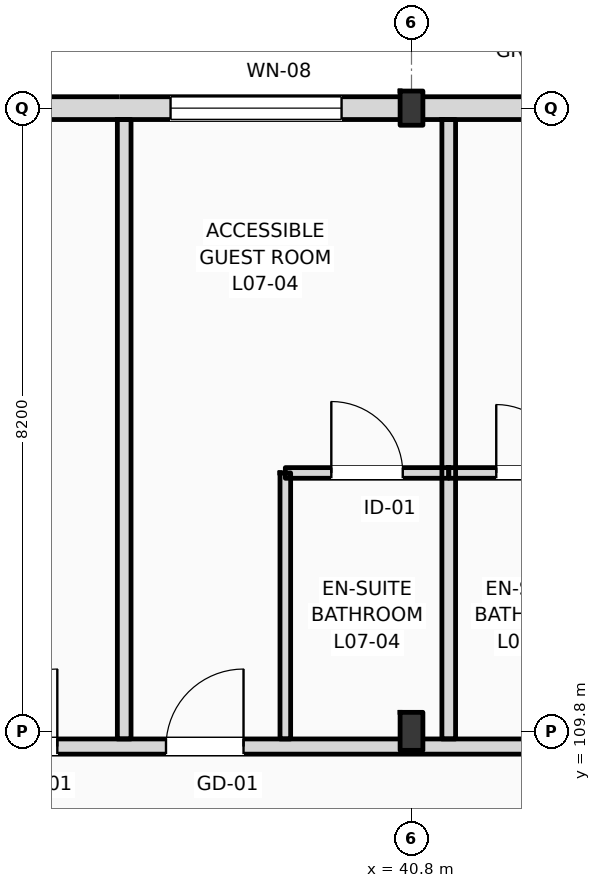
"""IFC4 building model, lengths in metres.
Left out: names, types, materials, properties, quantities, classifications, styles, units other than length and angle.
Written with IfcOpenShell. Run it as: python <this file> out.ifc"""

import sys

from ifc_helpers import new_model, si_unit, direction, frame, frame_2d, origin, origin_2d, place, context, subcontext, project, spatial, rectangle, i_section, extrude, element, fill, save


model = new_model("IFC4")
c1 = context("Model", 3, precision=1e-05, world=origin(), true_north=direction((0.0, 1.0)))
c2 = subcontext(c1, "Body", "Model", "MODEL_VIEW")
j1 = project(units=[si_unit("LENGTHUNIT", "METRE"), si_unit("PLANEANGLEUNIT", "RADIAN")], contexts=[c1])
p1 = place(None, origin())
s1 = spatial("IfcSite", under=j1, at=p1, CompositionType="ELEMENT")
p2 = place(p1, origin())
s2 = spatial("IfcBuilding", under=s1, at=p2, CompositionType="ELEMENT")
p3 = place(p2, frame((0.0, 0.0, 31.8)))
s3 = spatial("IfcBuildingStorey", under=s2, at=p3, CompositionType="ELEMENT", Elevation=31.8)
p4 = place(p3, frame((40.8, 109.8, 0.0), z_axis=(0.0, 0.0, 1.0), x_axis=(1.0, 0.0, 0.0)))
e1 = element("IfcColumn", 1, at=p4, inside=s3, PredefinedType="COLUMN", context=c2, shape_type="SweptSolid", body=[
    extrude(i_section(OverallWidth=0.3, OverallDepth=0.5, WebThickness=0.014, FlangeThickness=0.028, FilletRadius=0.027, at=origin_2d()), origin(), (0.0, 0.0, 1.0), 3.6),
])
p5 = place(p3, frame((40.8, 118.0, 0.0), z_axis=(0.0, 0.0, 1.0), x_axis=(1.0, 0.0, 0.0)))
e2 = element("IfcColumn", 2, at=p5, inside=s3, PredefinedType="COLUMN", context=c2, shape_type="SweptSolid", body=[
    extrude(i_section(OverallWidth=0.3, OverallDepth=0.45, WebThickness=0.014, FlangeThickness=0.026, FilletRadius=0.027, at=origin_2d()), origin(), (0.0, 0.0, 1.0), 3.6),
])
p6 = place(p3, frame((22.5, 118.0, 0.0), z_axis=(0.0, 0.0, 1.0), x_axis=(1.0, 0.0, 0.0)))
e3 = element("IfcWall", 3, at=p6, inside=s3, PredefinedType="STANDARD", context=c2, shape_type="SweptSolid", body=[
    extrude(rectangle(XDim=97.5, YDim=0.3, at=frame_2d((48.75, 0.0))), origin(), (0.0, 0.0, 1.0), 2.72),
])
p7 = place(p6, frame((3.61, 0.0, 0.9)))
e4 = element("IfcOpeningElement", 4, at=p7, cuts=e3, PredefinedType="OPENING", context=c2, shape_type="SweptSolid", body=[
    extrude(rectangle(XDim=1.1, YDim=1.64, at=frame_2d((0.55, 0.82))), frame((0.0, 0.16, 0.0), z_axis=(0.0, -1.0, 0.0), x_axis=(1.0, 0.0, 0.0)), (0.0, 0.0, 1.0), 0.32),
])
p8 = place(p6, frame((6.855, 0.0, 0.0)))
e5 = element("IfcOpeningElement", 5, at=p8, cuts=e3, PredefinedType="OPENING", context=c2, shape_type="SweptSolid", body=[
    extrude(rectangle(XDim=1.2, YDim=2.25, at=frame_2d((0.6, 1.125))), frame((0.0, 0.16, 0.0), z_axis=(0.0, -1.0, 0.0), x_axis=(1.0, 0.0, 0.0)), (0.0, 0.0, 1.0), 0.32),
])
p9 = place(p6, frame((11.405, 0.0, 0.9)))
e6 = element("IfcOpeningElement", 6, at=p9, cuts=e3, PredefinedType="OPENING", context=c2, shape_type="SweptSolid", body=[
    extrude(rectangle(XDim=2.1, YDim=1.64, at=frame_2d((1.05, 0.82))), frame((0.0, 0.16, 0.0), z_axis=(0.0, -1.0, 0.0), x_axis=(1.0, 0.0, 0.0)), (0.0, 0.0, 1.0), 0.32),
])
p10 = place(p6, frame((15.13, 0.0, 0.9)))
e7 = element("IfcOpeningElement", 7, at=p10, cuts=e3, PredefinedType="OPENING", context=c2, shape_type="SweptSolid", body=[
    extrude(rectangle(XDim=2.25, YDim=1.64, at=frame_2d((1.125, 0.82))), frame((0.0, 0.16, 0.0), z_axis=(0.0, -1.0, 0.0), x_axis=(1.0, 0.0, 0.0)), (0.0, 0.0, 1.0), 0.32),
])
p11 = place(p6, frame((21.53, 0.0, 0.0)))
e8 = element("IfcOpeningElement", 8, at=p11, cuts=e3, PredefinedType="OPENING", context=c2, shape_type="SweptSolid", body=[
    extrude(rectangle(XDim=1.2, YDim=2.25, at=frame_2d((0.6, 1.125))), frame((0.0, 0.16, 0.0), z_axis=(0.0, -1.0, 0.0), x_axis=(1.0, 0.0, 0.0)), (0.0, 0.0, 1.0), 0.32),
])
p12 = place(p6, frame((24.18, 0.0, 0.9)))
e9 = element("IfcOpeningElement", 9, at=p12, cuts=e3, PredefinedType="OPENING", context=c2, shape_type="SweptSolid", body=[
    extrude(rectangle(XDim=1.1, YDim=1.64, at=frame_2d((0.55, 0.82))), frame((0.0, 0.16, 0.0), z_axis=(0.0, -1.0, 0.0), x_axis=(1.0, 0.0, 0.0)), (0.0, 0.0, 1.0), 0.32),
])
p13 = place(p6, frame((29.105, 0.0, 0.9)))
e10 = element("IfcOpeningElement", 10, at=p13, cuts=e3, PredefinedType="OPENING", context=c2, shape_type="SweptSolid", body=[
    extrude(rectangle(XDim=2.7, YDim=1.64, at=frame_2d((1.35, 0.82))), frame((0.0, 0.16, 0.0), z_axis=(0.0, -1.0, 0.0), x_axis=(1.0, 0.0, 0.0)), (0.0, 0.0, 1.0), 0.32),
])
p14 = place(p6, frame((34.83, 0.0, 0.9)))
e11 = element("IfcOpeningElement", 11, at=p14, cuts=e3, PredefinedType="OPENING", context=c2, shape_type="SweptSolid", body=[
    extrude(rectangle(XDim=1.8, YDim=1.64, at=frame_2d((0.9, 0.82))), frame((0.0, 0.16, 0.0), z_axis=(0.0, -1.0, 0.0), x_axis=(1.0, 0.0, 0.0)), (0.0, 0.0, 1.0), 0.32),
])
p15 = place(p6, frame((38.525, 0.0, 0.0)))
e12 = element("IfcOpeningElement", 12, at=p15, cuts=e3, PredefinedType="OPENING", context=c2, shape_type="SweptSolid", body=[
    extrude(rectangle(XDim=1.2, YDim=2.25, at=frame_2d((0.6, 1.125))), frame((0.0, 0.16, 0.0), z_axis=(0.0, -1.0, 0.0), x_axis=(1.0, 0.0, 0.0)), (0.0, 0.0, 1.0), 0.32),
])
p16 = place(p6, frame((42.73, 0.0, 0.9)))
e13 = element("IfcOpeningElement", 13, at=p16, cuts=e3, PredefinedType="OPENING", context=c2, shape_type="SweptSolid", body=[
    extrude(rectangle(XDim=3.05, YDim=1.64, at=frame_2d((1.525, 0.82))), frame((0.0, 0.16, 0.0), z_axis=(0.0, -1.0, 0.0), x_axis=(1.0, 0.0, 0.0)), (0.0, 0.0, 1.0), 0.32),
])
p17 = place(p6, frame((47.155, 0.0, 0.9)))
e14 = element("IfcOpeningElement", 14, at=p17, cuts=e3, PredefinedType="OPENING", context=c2, shape_type="SweptSolid", body=[
    extrude(rectangle(XDim=1.35, YDim=1.64, at=frame_2d((0.675, 0.82))), frame((0.0, 0.16, 0.0), z_axis=(0.0, -1.0, 0.0), x_axis=(1.0, 0.0, 0.0)), (0.0, 0.0, 1.0), 0.32),
])
p18 = place(p6, frame((53.065, 0.0, 0.0)))
e15 = element("IfcOpeningElement", 15, at=p18, cuts=e3, PredefinedType="OPENING", context=c2, shape_type="SweptSolid", body=[
    extrude(rectangle(XDim=1.2, YDim=2.25, at=frame_2d((0.6, 1.125))), frame((0.0, 0.16, 0.0), z_axis=(0.0, -1.0, 0.0), x_axis=(1.0, 0.0, 0.0)), (0.0, 0.0, 1.0), 0.32),
])
p19 = place(p6, frame((58.2, 0.0, 0.9)))
e16 = element("IfcOpeningElement", 16, at=p19, cuts=e3, PredefinedType="OPENING", context=c2, shape_type="SweptSolid", body=[
    extrude(rectangle(XDim=1.8, YDim=1.64, at=frame_2d((0.9, 0.82))), frame((0.0, 0.16, 0.0), z_axis=(0.0, -1.0, 0.0), x_axis=(1.0, 0.0, 0.0)), (0.0, 0.0, 1.0), 0.32),
])
p20 = place(p6, frame((61.13, 0.0, 0.9)))
e17 = element("IfcOpeningElement", 17, at=p20, cuts=e3, PredefinedType="OPENING", context=c2, shape_type="SweptSolid", body=[
    extrude(rectangle(XDim=3.05, YDim=1.64, at=frame_2d((1.525, 0.82))), frame((0.0, 0.16, 0.0), z_axis=(0.0, -1.0, 0.0), x_axis=(1.0, 0.0, 0.0)), (0.0, 0.0, 1.0), 0.32),
])
p21 = place(p6, frame((67.93, 0.0, 0.0)))
e18 = element("IfcOpeningElement", 18, at=p21, cuts=e3, PredefinedType="OPENING", context=c2, shape_type="SweptSolid", body=[
    extrude(rectangle(XDim=1.2, YDim=2.25, at=frame_2d((0.6, 1.125))), frame((0.0, 0.16, 0.0), z_axis=(0.0, -1.0, 0.0), x_axis=(1.0, 0.0, 0.0)), (0.0, 0.0, 1.0), 0.32),
])
p22 = place(p6, frame((70.39, 0.0, 0.0)))
e19 = element("IfcOpeningElement", 19, at=p22, cuts=e3, PredefinedType="OPENING", context=c2, shape_type="SweptSolid", body=[
    extrude(rectangle(XDim=1.2, YDim=2.25, at=frame_2d((0.6, 1.125))), frame((0.0, 0.16, 0.0), z_axis=(0.0, -1.0, 0.0), x_axis=(1.0, 0.0, 0.0)), (0.0, 0.0, 1.0), 0.32),
])
p23 = place(p6, frame((75.905, 0.0, 0.9)))
e20 = element("IfcOpeningElement", 20, at=p23, cuts=e3, PredefinedType="OPENING", context=c2, shape_type="SweptSolid", body=[
    extrude(rectangle(XDim=1.1, YDim=1.5, at=frame_2d((0.55, 0.75))), frame((0.0, 0.16, 0.0), z_axis=(0.0, -1.0, 0.0), x_axis=(1.0, 0.0, 0.0)), (0.0, 0.0, 1.0), 0.32),
])
p24 = place(p6, frame((81.63, 0.0, 0.9)))
e21 = element("IfcOpeningElement", 21, at=p24, cuts=e3, PredefinedType="OPENING", context=c2, shape_type="SweptSolid", body=[
    extrude(rectangle(XDim=1.1, YDim=1.6, at=frame_2d((0.55, 0.8))), frame((0.0, 0.16, 0.0), z_axis=(0.0, -1.0, 0.0), x_axis=(1.0, 0.0, 0.0)), (0.0, 0.0, 1.0), 0.32),
])
p25 = place(p6, frame((84.955, 0.0, 0.9)))
e22 = element("IfcOpeningElement", 22, at=p25, cuts=e3, PredefinedType="OPENING", context=c2, shape_type="SweptSolid", body=[
    extrude(rectangle(XDim=1.4, YDim=1.64, at=frame_2d((0.7, 0.82))), frame((0.0, 0.16, 0.0), z_axis=(0.0, -1.0, 0.0), x_axis=(1.0, 0.0, 0.0)), (0.0, 0.0, 1.0), 0.32),
])
p26 = place(p6, frame((90.055, 0.0, 0.9)))
e23 = element("IfcOpeningElement", 23, at=p26, cuts=e3, PredefinedType="OPENING", context=c2, shape_type="SweptSolid", body=[
    extrude(rectangle(XDim=1.6, YDim=1.64, at=frame_2d((0.8, 0.82))), frame((0.0, 0.16, 0.0), z_axis=(0.0, -1.0, 0.0), x_axis=(1.0, 0.0, 0.0)), (0.0, 0.0, 1.0), 0.32),
])
p27 = place(p6, frame((93.87, 0.0, 0.9)))
e24 = element("IfcOpeningElement", 24, at=p27, cuts=e3, PredefinedType="OPENING", context=c2, shape_type="SweptSolid", body=[
    extrude(rectangle(XDim=1.75, YDim=1.64, at=frame_2d((0.875, 0.82))), frame((0.0, 0.16, 0.0), z_axis=(0.0, -1.0, 0.0), x_axis=(1.0, 0.0, 0.0)), (0.0, 0.0, 1.0), 0.32),
])
p28 = place(p3, frame((10.65, 109.6, 0.0), z_axis=(0.0, 0.0, 1.0), x_axis=(1.0, 0.0, 0.0)))
e25 = element("IfcWall", 25, at=p28, inside=s3, PredefinedType="PARTITIONING", context=c2, shape_type="SweptSolid", body=[
    extrude(rectangle(XDim=109.21, YDim=0.2, at=frame_2d((54.605, 0.0))), origin(), (0.0, 0.0, 1.0), 2.72),
])
p29 = place(p28, frame((15.825, 0.0, 0.0)))
e26 = element("IfcOpeningElement", 26, at=p29, cuts=e25, PredefinedType="OPENING", context=c2, shape_type="SweptSolid", body=[
    extrude(rectangle(XDim=1.02, YDim=2.2, at=frame_2d((0.51, 1.1))), frame((0.0, 0.11, 0.0), z_axis=(0.0, -1.0, 0.0), x_axis=(1.0, 0.0, 0.0)), (0.0, 0.0, 1.0), 0.22),
])
p30 = place(p28, frame((19.87, 0.0, 0.0)))
e27 = element("IfcOpeningElement", 27, at=p30, cuts=e25, PredefinedType="OPENING", context=c2, shape_type="SweptSolid", body=[
    extrude(rectangle(XDim=1.02, YDim=2.2, at=frame_2d((0.51, 1.1))), frame((0.0, 0.11, 0.0), z_axis=(0.0, -1.0, 0.0), x_axis=(1.0, 0.0, 0.0)), (0.0, 0.0, 1.0), 0.22),
])
p31 = place(p28, frame((24.47, 0.0, 0.0)))
e28 = element("IfcOpeningElement", 28, at=p31, cuts=e25, PredefinedType="OPENING", context=c2, shape_type="SweptSolid", body=[
    extrude(rectangle(XDim=1.02, YDim=2.2, at=frame_2d((0.51, 1.1))), frame((0.0, 0.11, 0.0), z_axis=(0.0, -1.0, 0.0), x_axis=(1.0, 0.0, 0.0)), (0.0, 0.0, 1.0), 0.22),
])
p32 = place(p28, frame((26.92, 0.0, 0.0)))
e29 = element("IfcOpeningElement", 29, at=p32, cuts=e25, PredefinedType="OPENING", context=c2, shape_type="SweptSolid", body=[
    extrude(rectangle(XDim=1.02, YDim=2.2, at=frame_2d((0.51, 1.1))), frame((0.0, 0.11, 0.0), z_axis=(0.0, -1.0, 0.0), x_axis=(1.0, 0.0, 0.0)), (0.0, 0.0, 1.0), 0.22),
])
p33 = place(p28, frame((33.7, 0.0, 0.0)))
e30 = element("IfcOpeningElement", 30, at=p33, cuts=e25, PredefinedType="OPENING", context=c2, shape_type="SweptSolid", body=[
    extrude(rectangle(XDim=0.96, YDim=2.2, at=frame_2d((0.48, 1.1))), frame((0.0, 0.11, 0.0), z_axis=(0.0, -1.0, 0.0), x_axis=(1.0, 0.0, 0.0)), (0.0, 0.0, 1.0), 0.22),
])
p34 = place(p28, frame((35.9, 0.0, 0.0)))
e31 = element("IfcOpeningElement", 31, at=p34, cuts=e25, PredefinedType="OPENING", context=c2, shape_type="SweptSolid", body=[
    extrude(rectangle(XDim=0.96, YDim=2.2, at=frame_2d((0.48, 1.1))), frame((0.0, 0.11, 0.0), z_axis=(0.0, -1.0, 0.0), x_axis=(1.0, 0.0, 0.0)), (0.0, 0.0, 1.0), 0.22),
])
p35 = place(p28, frame((42.9, 0.0, 0.0)))
e32 = element("IfcOpeningElement", 32, at=p35, cuts=e25, PredefinedType="OPENING", context=c2, shape_type="SweptSolid", body=[
    extrude(rectangle(XDim=0.96, YDim=2.2, at=frame_2d((0.48, 1.1))), frame((0.0, 0.11, 0.0), z_axis=(0.0, -1.0, 0.0), x_axis=(1.0, 0.0, 0.0)), (0.0, 0.0, 1.0), 0.22),
])
p36 = place(p28, frame((47.5, 0.0, 0.0)))
e33 = element("IfcOpeningElement", 33, at=p36, cuts=e25, PredefinedType="OPENING", context=c2, shape_type="SweptSolid", body=[
    extrude(rectangle(XDim=0.96, YDim=2.2, at=frame_2d((0.48, 1.1))), frame((0.0, 0.11, 0.0), z_axis=(0.0, -1.0, 0.0), x_axis=(1.0, 0.0, 0.0)), (0.0, 0.0, 1.0), 0.22),
])
p37 = place(p28, frame((49.95, 0.0, 0.0)))
e34 = element("IfcOpeningElement", 34, at=p37, cuts=e25, PredefinedType="OPENING", context=c2, shape_type="SweptSolid", body=[
    extrude(rectangle(XDim=0.96, YDim=2.2, at=frame_2d((0.48, 1.1))), frame((0.0, 0.11, 0.0), z_axis=(0.0, -1.0, 0.0), x_axis=(1.0, 0.0, 0.0)), (0.0, 0.0, 1.0), 0.22),
])
p38 = place(p28, frame((56.7, 0.0, 0.0)))
e35 = element("IfcOpeningElement", 35, at=p38, cuts=e25, PredefinedType="OPENING", context=c2, shape_type="SweptSolid", body=[
    extrude(rectangle(XDim=0.96, YDim=2.2, at=frame_2d((0.48, 1.1))), frame((0.0, 0.11, 0.0), z_axis=(0.0, -1.0, 0.0), x_axis=(1.0, 0.0, 0.0)), (0.0, 0.0, 1.0), 0.22),
])
p39 = place(p28, frame((59.15, 0.0, 0.0)))
e36 = element("IfcOpeningElement", 36, at=p39, cuts=e25, PredefinedType="OPENING", context=c2, shape_type="SweptSolid", body=[
    extrude(rectangle(XDim=0.96, YDim=2.2, at=frame_2d((0.48, 1.1))), frame((0.0, 0.11, 0.0), z_axis=(0.0, -1.0, 0.0), x_axis=(1.0, 0.0, 0.0)), (0.0, 0.0, 1.0), 0.22),
])
p40 = place(p28, frame((65.9, 0.0, 0.0)))
e37 = element("IfcOpeningElement", 37, at=p40, cuts=e25, PredefinedType="OPENING", context=c2, shape_type="SweptSolid", body=[
    extrude(rectangle(XDim=0.96, YDim=2.2, at=frame_2d((0.48, 1.1))), frame((0.0, 0.11, 0.0), z_axis=(0.0, -1.0, 0.0), x_axis=(1.0, 0.0, 0.0)), (0.0, 0.0, 1.0), 0.22),
])
p41 = place(p28, frame((70.5, 0.0, 0.0)))
e38 = element("IfcOpeningElement", 38, at=p41, cuts=e25, PredefinedType="OPENING", context=c2, shape_type="SweptSolid", body=[
    extrude(rectangle(XDim=0.96, YDim=2.2, at=frame_2d((0.48, 1.1))), frame((0.0, 0.11, 0.0), z_axis=(0.0, -1.0, 0.0), x_axis=(1.0, 0.0, 0.0)), (0.0, 0.0, 1.0), 0.22),
])
p42 = place(p28, frame((72.95, 0.0, 0.0)))
e39 = element("IfcOpeningElement", 39, at=p42, cuts=e25, PredefinedType="OPENING", context=c2, shape_type="SweptSolid", body=[
    extrude(rectangle(XDim=0.96, YDim=2.2, at=frame_2d((0.48, 1.1))), frame((0.0, 0.11, 0.0), z_axis=(0.0, -1.0, 0.0), x_axis=(1.0, 0.0, 0.0)), (0.0, 0.0, 1.0), 0.22),
])
p43 = place(p28, frame((79.7, 0.0, 0.0)))
e40 = element("IfcOpeningElement", 40, at=p43, cuts=e25, PredefinedType="OPENING", context=c2, shape_type="SweptSolid", body=[
    extrude(rectangle(XDim=0.96, YDim=2.2, at=frame_2d((0.48, 1.1))), frame((0.0, 0.11, 0.0), z_axis=(0.0, -1.0, 0.0), x_axis=(1.0, 0.0, 0.0)), (0.0, 0.0, 1.0), 0.22),
])
p44 = place(p28, frame((82.15, 0.0, 0.0)))
e41 = element("IfcOpeningElement", 41, at=p44, cuts=e25, PredefinedType="OPENING", context=c2, shape_type="SweptSolid", body=[
    extrude(rectangle(XDim=0.96, YDim=2.2, at=frame_2d((0.48, 1.1))), frame((0.0, 0.11, 0.0), z_axis=(0.0, -1.0, 0.0), x_axis=(1.0, 0.0, 0.0)), (0.0, 0.0, 1.0), 0.22),
])
p45 = place(p28, frame((88.9, 0.0, 0.0)))
e42 = element("IfcOpeningElement", 42, at=p45, cuts=e25, PredefinedType="OPENING", context=c2, shape_type="SweptSolid", body=[
    extrude(rectangle(XDim=0.96, YDim=2.2, at=frame_2d((0.48, 1.1))), frame((0.0, 0.11, 0.0), z_axis=(0.0, -1.0, 0.0), x_axis=(1.0, 0.0, 0.0)), (0.0, 0.0, 1.0), 0.22),
])
p46 = place(p28, frame((93.75, 0.0, 0.0)))
e43 = element("IfcOpeningElement", 43, at=p46, cuts=e25, PredefinedType="OPENING", context=c2, shape_type="SweptSolid", body=[
    extrude(rectangle(XDim=0.96, YDim=2.2, at=frame_2d((0.48, 1.1))), frame((0.0, 0.11, 0.0), z_axis=(0.0, -1.0, 0.0), x_axis=(1.0, 0.0, 0.0)), (0.0, 0.0, 1.0), 0.22),
])
p47 = place(p28, frame((98.1, 0.0, 0.0)))
e44 = element("IfcOpeningElement", 44, at=p47, cuts=e25, PredefinedType="OPENING", context=c2, shape_type="SweptSolid", body=[
    extrude(rectangle(XDim=0.96, YDim=2.2, at=frame_2d((0.48, 1.1))), frame((0.0, 0.11, 0.0), z_axis=(0.0, -1.0, 0.0), x_axis=(1.0, 0.0, 0.0)), (0.0, 0.0, 1.0), 0.22),
])
p48 = place(p28, frame((102.7, 0.0, 0.0)))
e45 = element("IfcOpeningElement", 45, at=p48, cuts=e25, PredefinedType="OPENING", context=c2, shape_type="SweptSolid", body=[
    extrude(rectangle(XDim=0.96, YDim=2.2, at=frame_2d((0.48, 1.1))), frame((0.0, 0.11, 0.0), z_axis=(0.0, -1.0, 0.0), x_axis=(1.0, 0.0, 0.0)), (0.0, 0.0, 1.0), 0.22),
])
p49 = place(p28, frame((105.04, 0.0, 0.0)))
e46 = element("IfcOpeningElement", 46, at=p49, cuts=e25, PredefinedType="OPENING", context=c2, shape_type="SweptSolid", body=[
    extrude(rectangle(XDim=0.96, YDim=2.2, at=frame_2d((0.48, 1.1))), frame((0.0, 0.11, 0.0), z_axis=(0.0, -1.0, 0.0), x_axis=(1.0, 0.0, 0.0)), (0.0, 0.0, 1.0), 0.22),
])
p50 = place(p28, frame((2.716, 0.0, 0.0)))
e47 = element("IfcOpeningElement", 47, at=p50, cuts=e25, PredefinedType="OPENING", context=c2, shape_type="SweptSolid", body=[
    extrude(rectangle(XDim=1.35, YDim=2.25, at=frame_2d((0.675, 1.125))), frame((0.0, 0.11, 0.0), z_axis=(0.0, -1.0, 0.0), x_axis=(1.0, 0.0, 0.0)), (0.0, 0.0, 1.0), 0.22),
])
p51 = place(p28, frame((6.65, 0.0, 0.0)))
e48 = element("IfcOpeningElement", 48, at=p51, cuts=e25, PredefinedType="OPENING", context=c2, shape_type="SweptSolid", body=[
    extrude(rectangle(XDim=1.35, YDim=2.25, at=frame_2d((0.675, 1.125))), frame((0.0, 0.11, 0.0), z_axis=(0.0, -1.0, 0.0), x_axis=(1.0, 0.0, 0.0)), (0.0, 0.0, 1.0), 0.22),
])
p52 = place(p28, frame((10.583, 0.0, 0.0)))
e49 = element("IfcOpeningElement", 49, at=p52, cuts=e25, PredefinedType="OPENING", context=c2, shape_type="SweptSolid", body=[
    extrude(rectangle(XDim=1.35, YDim=2.25, at=frame_2d((0.675, 1.125))), frame((0.0, 0.11, 0.0), z_axis=(0.0, -1.0, 0.0), x_axis=(1.0, 0.0, 0.0)), (0.0, 0.0, 1.0), 0.22),
])
for number, where, z_axis, x_axis in (
    (50, (37.02, 109.7, 0.0), (0.0, 0.0, 1.0), (0.0, 1.0, 0.0)),
    (51, (41.29, 109.7, 0.0), (0.0, 0.0, 1.0), (0.0, 1.0, 0.0)),
):
    element("IfcWall", number, at=place(p3, frame(where, z_axis=z_axis, x_axis=x_axis)), inside=s3, PredefinedType="PARTITIONING", context=c2, shape_type="SweptSolid", body=[
        extrude(rectangle(XDim=8.15, YDim=0.18, at=frame_2d((4.075, 0.0))), origin(), (0.0, 0.0, 1.0), 3.36),
    ])
p53 = place(p3, frame((39.14, 109.7, 0.0), z_axis=(0.0, 0.0, 1.0), x_axis=(0.0, 1.0, 0.0)))
e52 = element("IfcWall", 52, at=p53, inside=s3, PredefinedType="PARTITIONING", context=c2, shape_type="SweptSolid", body=[
    extrude(rectangle(XDim=3.5, YDim=0.14, at=frame_2d((1.75, 0.0))), origin(), (0.0, 0.0, 1.0), 3.36),
])
p54 = place(p3, frame((39.14, 113.2, 0.0), z_axis=(0.0, 0.0, 1.0), x_axis=(1.0, 0.0, 0.0)))
e53 = element("IfcWall", 53, at=p54, inside=s3, PredefinedType="PARTITIONING", context=c2, shape_type="SweptSolid", body=[
    extrude(rectangle(XDim=2.15, YDim=0.14, at=frame_2d((1.075, 0.0))), origin(), (0.0, 0.0, 1.0), 3.36),
])
p55 = place(p54, frame((0.605, 0.0, 0.0)))
e54 = element("IfcOpeningElement", 54, at=p55, cuts=e53, PredefinedType="OPENING", context=c2, shape_type="SweptSolid", body=[
    extrude(rectangle(XDim=0.94, YDim=2.15, at=frame_2d((0.47, 1.075))), frame((0.0, 0.08, 0.0), z_axis=(0.0, -1.0, 0.0), x_axis=(1.0, 0.0, 0.0)), (0.0, 0.0, 1.0), 0.16),
])
p56 = place(p3, frame((41.29, 113.2, 0.0), z_axis=(0.0, 0.0, 1.0), x_axis=(1.0, 0.0, 0.0)))
e55 = element("IfcWall", 55, at=p56, inside=s3, PredefinedType="PARTITIONING", context=c2, shape_type="SweptSolid", body=[
    extrude(rectangle(XDim=2.15, YDim=0.14, at=frame_2d((1.075, 0.0))), origin(), (0.0, 0.0, 1.0), 3.36),
])
p57 = place(p56, frame((0.625, 0.0, 0.0)))
e56 = element("IfcOpeningElement", 56, at=p57, cuts=e55, PredefinedType="OPENING", context=c2, shape_type="SweptSolid", body=[
    extrude(rectangle(XDim=0.9, YDim=2.1, at=frame_2d((0.45, 1.05))), frame((0.0, 0.08, 0.0), z_axis=(0.0, -1.0, 0.0), x_axis=(1.0, 0.0, 0.0)), (0.0, 0.0, 1.0), 0.16),
])
p58 = place(p10, origin())
e57 = element("IfcWindow", 57, at=p58, inside=s3, PartitioningType="DOUBLE_PANEL_VERTICAL", PredefinedType="WINDOW", context=c2, shape_type="SweptSolid", body=[
    extrude(rectangle(XDim=2.25, YDim=1.64, at=frame_2d((1.125, 0.82))), frame((0.0, 0.03, 0.0), z_axis=(0.0, -1.0, 0.0), x_axis=(1.0, 0.0, 0.0)), (0.0, 0.0, 1.0), 0.06),
])
fill(e7, e57)
p59 = place(p31, origin())
e58 = element("IfcDoor", 58, at=p59, inside=s3, OperationType="SINGLE_SWING_RIGHT", PredefinedType="DOOR", context=c2, shape_type="SweptSolid", body=[
    extrude(rectangle(XDim=1.02, YDim=2.2, at=frame_2d((0.51, 1.1))), frame((0.0, 0.025, 0.0), z_axis=(0.0, -1.0, 0.0), x_axis=(1.0, 0.0, 0.0)), (0.0, 0.0, 1.0), 0.05),
])
fill(e28, e58)
p60 = place(p32, origin())
e59 = element("IfcDoor", 59, at=p60, inside=s3, OperationType="SINGLE_SWING_RIGHT", PredefinedType="DOOR", context=c2, shape_type="SweptSolid", body=[
    extrude(rectangle(XDim=1.02, YDim=2.2, at=frame_2d((0.51, 1.1))), frame((0.0, 0.025, 0.0), z_axis=(0.0, -1.0, 0.0), x_axis=(1.0, 0.0, 0.0)), (0.0, 0.0, 1.0), 0.05),
])
fill(e29, e59)
p61 = place(p55, origin())
e60 = element("IfcDoor", 60, at=p61, inside=s3, OperationType="SINGLE_SWING_LEFT", PredefinedType="DOOR", context=c2, shape_type="SweptSolid", body=[
    extrude(rectangle(XDim=0.94, YDim=2.15, at=frame_2d((0.47, 1.075))), frame((0.0, 0.025, 0.0), z_axis=(0.0, -1.0, 0.0), x_axis=(1.0, 0.0, 0.0)), (0.0, 0.0, 1.0), 0.05),
])
fill(e54, e60)
p62 = place(p57, origin())
e61 = element("IfcDoor", 61, at=p62, inside=s3, OperationType="SINGLE_SWING_LEFT", PredefinedType="DOOR", context=c2, shape_type="SweptSolid", body=[
    extrude(rectangle(XDim=0.9, YDim=2.1, at=frame_2d((0.45, 1.05))), frame((0.0, 0.025, 0.0), z_axis=(0.0, -1.0, 0.0), x_axis=(1.0, 0.0, 0.0)), (0.0, 0.0, 1.0), 0.05),
])
fill(e56, e61)
save(model, sys.argv[1])
